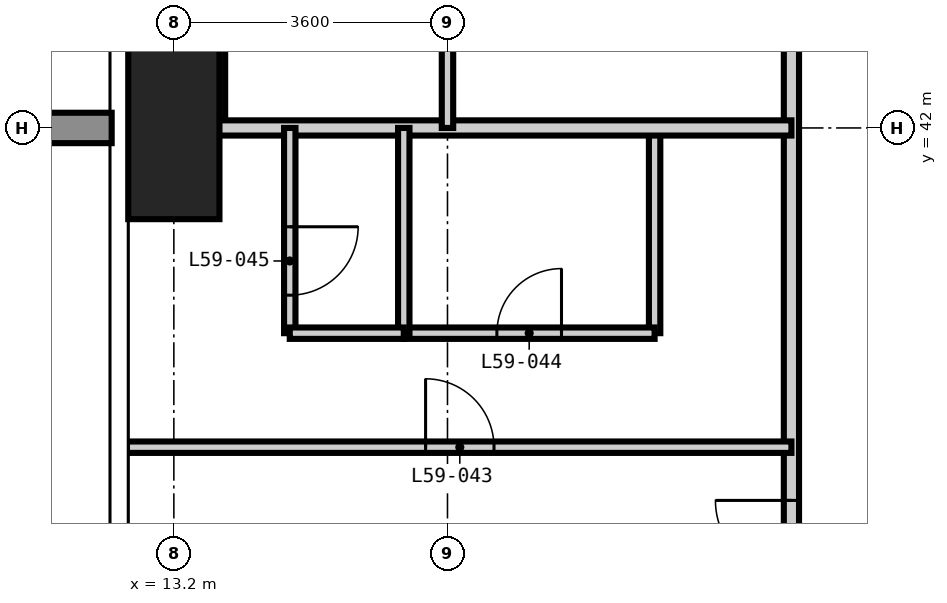
"""IFC4 building model, lengths in metres.
Left out: names, types, materials, properties, quantities, classifications, styles, units other than length and angle.
Written with IfcOpenShell. Run it as: python <this file> out.ifc"""

import sys

from ifc_helpers import new_model, si_unit, direction, frame, frame_2d, origin, origin_2d, place, context, subcontext, project, spatial, rectangle, extrude, element, fill, save


model = new_model("IFC4")
c1 = context("Model", 3, precision=1e-05, world=origin(), true_north=direction((0.0, 1.0)))
c2 = subcontext(c1, "Body", "Model", "MODEL_VIEW")
j1 = project(units=[si_unit("LENGTHUNIT", "METRE"), si_unit("PLANEANGLEUNIT", "RADIAN")], contexts=[c1])
p1 = place(None, origin())
s1 = spatial("IfcSite", under=j1, at=p1, CompositionType="ELEMENT")
p2 = place(p1, origin())
s2 = spatial("IfcBuilding", under=s1, at=p2, CompositionType="ELEMENT")
p3 = place(p2, frame((0.0, 0.0, 229.5)))
s3 = spatial("IfcBuildingStorey", under=s2, at=p3, CompositionType="ELEMENT", Elevation=229.5)
p4 = place(p3, frame((13.2, 42.0, -0.35), z_axis=(0.0, 0.0, 1.0), x_axis=(1.0, 0.0, 0.0)))
e1 = element("IfcColumn", 1, at=p4, inside=s3, PredefinedType="COLUMN", context=c2, shape_type="SweptSolid", body=[
    extrude(rectangle(XDim=1.2, YDim=2.4, at=origin_2d()), origin(), (0.0, 0.0, 1.0), 3.9),
])
p5 = place(p3, frame((13.8, 42.0, 0.0), z_axis=(0.0, 0.0, 1.0), x_axis=(0.0, 1.0, 0.0)))
e2 = element("IfcWall", 2, at=p5, inside=s3, PredefinedType="PARTITIONING", context=c2, shape_type="SweptSolid", body=[
    extrude(rectangle(XDim=3.6, YDim=0.15, at=frame_2d((1.8, 0.0))), origin(), (0.0, 0.0, 1.0), 3.55),
])
p6 = place(p5, frame((1.375, 0.0, 0.0)))
e3 = element("IfcOpeningElement", 3, at=p6, cuts=e2, PredefinedType="OPENING", context=c2, shape_type="SweptSolid", body=[
    extrude(rectangle(XDim=0.85, YDim=2.1, at=frame_2d((0.425, 1.05))), frame((0.0, 0.085, 0.0), z_axis=(0.0, -1.0, 0.0), x_axis=(1.0, 0.0, 0.0)), (0.0, 0.0, 1.0), 0.17),
])
p7 = place(p3, frame((19.525, 39.3, 0.0), z_axis=(0.0, 0.0, 1.0), x_axis=(0.0, 1.0, 0.0)))
e4 = element("IfcWall", 4, at=p7, inside=s3, PredefinedType="PARTITIONING", context=c2, shape_type="SweptSolid", body=[
    extrude(rectangle(XDim=2.7, YDim=0.15, at=frame_2d((1.35, 0.0))), origin(), (0.0, 0.0, 1.0), 3.55),
])
p8 = place(p3, frame((16.225, 39.3, 0.0), z_axis=(0.0, 0.0, 1.0), x_axis=(1.0, 0.0, 0.0)))
e5 = element("IfcWall", 5, at=p8, inside=s3, PredefinedType="PARTITIONING", context=c2, shape_type="SweptSolid", body=[
    extrude(rectangle(XDim=3.3, YDim=0.15, at=frame_2d((1.65, 0.0))), origin(), (0.0, 0.0, 1.0), 3.55),
])
p9 = place(p8, frame((1.225, 0.0, 0.0)))
e6 = element("IfcOpeningElement", 6, at=p9, cuts=e5, PredefinedType="OPENING", context=c2, shape_type="SweptSolid", body=[
    extrude(rectangle(XDim=0.85, YDim=2.1, at=frame_2d((0.425, 1.05))), frame((0.0, 0.085, 0.0), z_axis=(0.0, -1.0, 0.0), x_axis=(1.0, 0.0, 0.0)), (0.0, 0.0, 1.0), 0.17),
])
p10 = place(p3, frame((21.325, 13.15, 0.0), z_axis=(0.0, 0.0, 1.0), x_axis=(0.0, 1.0, 0.0)))
e7 = element("IfcWall", 7, at=p10, inside=s3, PredefinedType="PARTITIONING", context=c2, shape_type="SweptSolid", body=[
    extrude(rectangle(XDim=31.9, YDim=0.2, at=frame_2d((15.95, 0.0))), origin(), (0.0, 0.0, 1.0), 3.55),
])
p11 = place(p10, frame((6.15, 0.0, 0.0)))
e8 = element("IfcOpeningElement", 8, at=p11, cuts=e7, PredefinedType="OPENING", context=c2, shape_type="SweptSolid", body=[
    extrude(rectangle(XDim=1.0, YDim=2.2, at=frame_2d((0.5, 1.1))), frame((0.0, 0.11, 0.0), z_axis=(0.0, -1.0, 0.0), x_axis=(1.0, 0.0, 0.0)), (0.0, 0.0, 1.0), 0.22),
])
p12 = place(p10, frame((16.95, 0.0, 0.0)))
e9 = element("IfcOpeningElement", 9, at=p12, cuts=e7, PredefinedType="OPENING", context=c2, shape_type="SweptSolid", body=[
    extrude(rectangle(XDim=1.0, YDim=2.2, at=frame_2d((0.5, 1.1))), frame((0.0, 0.11, 0.0), z_axis=(0.0, -1.0, 0.0), x_axis=(1.0, 0.0, 0.0)), (0.0, 0.0, 1.0), 0.22),
])
p13 = place(p10, frame((22.95, 0.0, 0.0)))
e10 = element("IfcOpeningElement", 10, at=p13, cuts=e7, PredefinedType="OPENING", context=c2, shape_type="SweptSolid", body=[
    extrude(rectangle(XDim=1.0, YDim=2.2, at=frame_2d((0.5, 1.1))), frame((0.0, 0.11, 0.0), z_axis=(0.0, -1.0, 0.0), x_axis=(1.0, 0.0, 0.0)), (0.0, 0.0, 1.0), 0.22),
])
p14 = place(p10, frame((1.325, 0.0, 0.0)))
e11 = element("IfcOpeningElement", 11, at=p14, cuts=e7, PredefinedType="OPENING", context=c2, shape_type="SweptSolid", body=[
    extrude(rectangle(XDim=1.0, YDim=2.2, at=frame_2d((0.5, 1.1))), frame((0.0, 0.11, 0.0), z_axis=(0.0, -1.0, 0.0), x_axis=(1.0, 0.0, 0.0)), (0.0, 0.0, 1.0), 0.22),
])
p15 = place(p10, frame((29.875, 0.0, 0.0)))
e12 = element("IfcOpeningElement", 12, at=p15, cuts=e7, PredefinedType="OPENING", context=c2, shape_type="SweptSolid", body=[
    extrude(rectangle(XDim=1.0, YDim=2.2, at=frame_2d((0.5, 1.1))), frame((0.0, 0.11, 0.0), z_axis=(0.0, -1.0, 0.0), x_axis=(1.0, 0.0, 0.0)), (0.0, 0.0, 1.0), 0.22),
])
p16 = place(p3, frame((12.582, 42.0, 0.0), z_axis=(0.0, 0.0, 1.0), x_axis=(1.0, 0.0, 0.0)))
e13 = element("IfcWall", 13, at=p16, inside=s3, PredefinedType="PARTITIONING", context=c2, shape_type="SweptSolid", body=[
    extrude(rectangle(XDim=8.743, YDim=0.2, at=frame_2d((4.372, 0.0))), origin(), (0.0, 0.0, 1.0), 3.55),
])
p17 = place(p3, frame((14.725, 39.3, 0.0), z_axis=(0.0, 0.0, 1.0), x_axis=(0.0, 1.0, 0.0)))
e14 = element("IfcWall", 14, at=p17, inside=s3, PredefinedType="PARTITIONING", context=c2, shape_type="SweptSolid", body=[
    extrude(rectangle(XDim=2.7, YDim=0.15, at=frame_2d((1.35, 0.0))), origin(), (0.0, 0.0, 1.0), 3.55),
])
p18 = place(p17, frame((0.5, 0.0, 0.0)))
e15 = element("IfcOpeningElement", 15, at=p18, cuts=e14, PredefinedType="OPENING", context=c2, shape_type="SweptSolid", body=[
    extrude(rectangle(XDim=0.9, YDim=2.1, at=frame_2d((0.45, 1.05))), frame((0.0, 0.085, 0.0), z_axis=(0.0, -1.0, 0.0), x_axis=(1.0, 0.0, 0.0)), (0.0, 0.0, 1.0), 0.17),
])
p19 = place(p3, frame((16.225, 39.3, 0.0), z_axis=(0.0, 0.0, 1.0), x_axis=(0.0, 1.0, 0.0)))
e16 = element("IfcWall", 16, at=p19, inside=s3, PredefinedType="PARTITIONING", context=c2, shape_type="SweptSolid", body=[
    extrude(rectangle(XDim=2.7, YDim=0.15, at=frame_2d((1.35, 0.0))), origin(), (0.0, 0.0, 1.0), 3.55),
])
p20 = place(p3, frame((16.8, 42.0, 0.0), z_axis=(0.0, 0.0, 1.0), x_axis=(0.0, 1.0, 0.0)))
e17 = element("IfcWall", 17, at=p20, inside=s3, PredefinedType="PARTITIONING", context=c2, shape_type="SweptSolid", body=[
    extrude(rectangle(XDim=12.618, YDim=0.15, at=frame_2d((6.309, 0.0))), origin(), (0.0, 0.0, 1.0), 3.55),
])
p21 = place(p20, frame((8.85, 0.0, 0.0)))
e18 = element("IfcOpeningElement", 18, at=p21, cuts=e17, PredefinedType="OPENING", context=c2, shape_type="SweptSolid", body=[
    extrude(rectangle(XDim=0.9, YDim=2.1, at=frame_2d((0.45, 1.05))), frame((0.0, 0.085, 0.0), z_axis=(0.0, -1.0, 0.0), x_axis=(1.0, 0.0, 0.0)), (0.0, 0.0, 1.0), 0.17),
])
p22 = place(p3, frame((12.582, 37.8, 0.0), z_axis=(0.0, 0.0, 1.0), x_axis=(1.0, 0.0, 0.0)))
e19 = element("IfcWall", 19, at=p22, inside=s3, PredefinedType="PARTITIONING", context=c2, shape_type="SweptSolid", body=[
    extrude(rectangle(XDim=8.743, YDim=0.15, at=frame_2d((4.372, 0.0))), origin(), (0.0, 0.0, 1.0), 3.55),
])
p23 = place(p22, frame((3.93, 0.0, 0.0)))
e20 = element("IfcOpeningElement", 20, at=p23, cuts=e19, PredefinedType="OPENING", context=c2, shape_type="SweptSolid", body=[
    extrude(rectangle(XDim=0.9, YDim=2.1, at=frame_2d((0.45, 1.05))), frame((0.0, 0.085, 0.0), z_axis=(0.0, -1.0, 0.0), x_axis=(1.0, 0.0, 0.0)), (0.0, 0.0, 1.0), 0.17),
])
p24 = place(p3, frame((14.725, 39.3, 0.0), z_axis=(0.0, 0.0, 1.0), x_axis=(1.0, 0.0, 0.0)))
e21 = element("IfcWall", 21, at=p24, inside=s3, PredefinedType="PARTITIONING", context=c2, shape_type="SweptSolid", body=[
    extrude(rectangle(XDim=1.5, YDim=0.15, at=frame_2d((0.75, 0.0))), origin(), (0.0, 0.0, 1.0), 3.55),
])
p25 = place(p13, origin())
e22 = element("IfcDoor", 22, at=p25, inside=s3, OperationType="SINGLE_SWING_RIGHT", PredefinedType="DOOR", context=c2, shape_type="SweptSolid", body=[
    extrude(rectangle(XDim=1.0, YDim=2.2, at=frame_2d((0.5, 1.1))), frame((0.0, 0.025, 0.0), z_axis=(0.0, -1.0, 0.0), x_axis=(1.0, 0.0, 0.0)), (0.0, 0.0, 1.0), 0.05),
])
fill(e10, e22)
p26 = place(p23, origin())
e23 = element("IfcDoor", 23, at=p26, inside=s3, OperationType="SINGLE_SWING_LEFT", PredefinedType="DOOR", context=c2, shape_type="SweptSolid", body=[
    extrude(rectangle(XDim=0.9, YDim=2.1, at=frame_2d((0.45, 1.05))), frame((0.0, 0.025, 0.0), z_axis=(0.0, -1.0, 0.0), x_axis=(1.0, 0.0, 0.0)), (0.0, 0.0, 1.0), 0.05),
])
fill(e20, e23)
p27 = place(p9, origin())
e24 = element("IfcDoor", 24, at=p27, inside=s3, OperationType="SINGLE_SWING_RIGHT", PredefinedType="DOOR", context=c2, shape_type="SweptSolid", body=[
    extrude(rectangle(XDim=0.85, YDim=2.1, at=frame_2d((0.425, 1.05))), frame((0.0, 0.025, 0.0), z_axis=(0.0, -1.0, 0.0), x_axis=(1.0, 0.0, 0.0)), (0.0, 0.0, 1.0), 0.05),
])
fill(e6, e24)
p28 = place(p18, frame((0.9, 0.0, 0.0), z_axis=(0.0, 0.0, 1.0), x_axis=(-1.0, 0.0, 0.0)))
e25 = element("IfcDoor", 25, at=p28, inside=s3, OperationType="SINGLE_SWING_LEFT", PredefinedType="DOOR", context=c2, shape_type="SweptSolid", body=[
    extrude(rectangle(XDim=0.9, YDim=2.1, at=frame_2d((0.45, 1.05))), frame((0.0, 0.025, 0.0), z_axis=(0.0, -1.0, 0.0), x_axis=(1.0, 0.0, 0.0)), (0.0, 0.0, 1.0), 0.05),
])
fill(e15, e25)
save(model, sys.argv[1])
